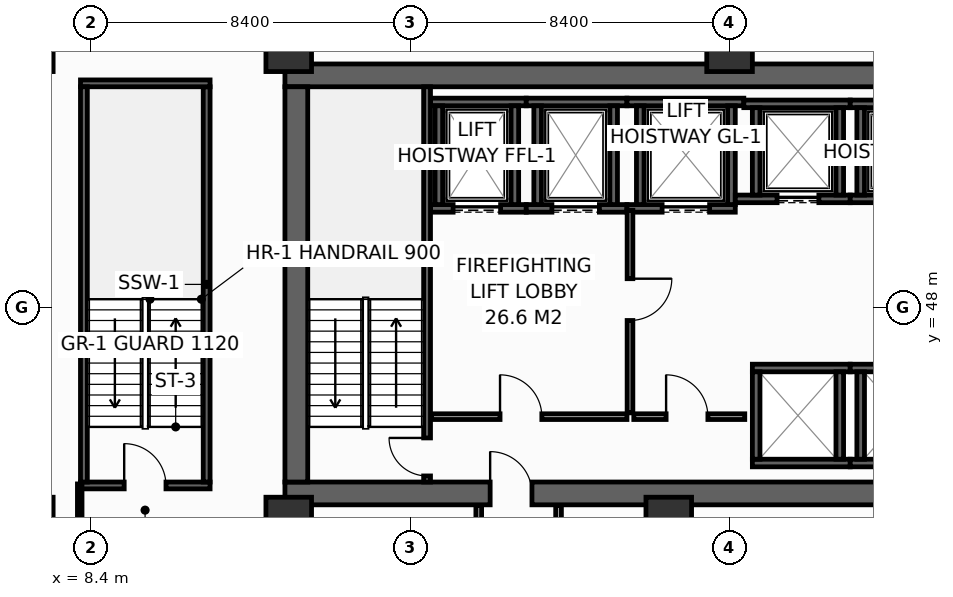
"""IFC4 building model, lengths in metres.
Left out: names, types, materials, properties, quantities, classifications, styles, units other than length and angle.
Written with IfcOpenShell. Run it as: python <this file> out.ifc"""

import sys

from ifc_helpers import new_model, si_unit, direction, frame, frame_2d, origin, origin_2d, place, context, subcontext, project, spatial, rectangle, hollow_rectangle, extrude, element, fill, save


model = new_model("IFC4")
c1 = context("Model", 3, precision=1e-05, world=origin(), true_north=direction((0.0, 1.0)))
c2 = subcontext(c1, "Body", "Model", "MODEL_VIEW")
j1 = project(units=[si_unit("LENGTHUNIT", "METRE"), si_unit("PLANEANGLEUNIT", "RADIAN")], contexts=[c1])
p1 = place(None, origin())
s1 = spatial("IfcSite", under=j1, at=p1, CompositionType="ELEMENT")
p2 = place(p1, origin())
s2 = spatial("IfcBuilding", under=s1, at=p2, CompositionType="ELEMENT")
p3 = place(p2, frame((0.0, 0.0, 42.8)))
s3 = spatial("IfcBuildingStorey", under=s2, at=p3, CompositionType="ELEMENT", Elevation=42.8)
p4 = place(p3, frame((13.5, 43.1, 0.0), z_axis=(0.0, 0.0, 1.0), x_axis=(1.0, 0.0, 0.0)))
e1 = element("IfcWall", 1, at=p4, inside=s3, PredefinedType="SHEAR", context=c2, shape_type="SweptSolid", body=[
    extrude(rectangle(XDim=32.9, YDim=0.6, at=frame_2d((16.45, 0.0))), origin(), (0.0, 0.0, 1.0), 4.15),
])
p5 = place(p4, frame((5.4, 0.0, 0.0)))
e2 = element("IfcOpeningElement", 2, at=p5, cuts=e1, PredefinedType="OPENING", context=c2, shape_type="SweptSolid", body=[
    extrude(rectangle(XDim=1.1, YDim=2.15, at=frame_2d((0.55, 1.075))), frame((0.0, 0.31, 0.0), z_axis=(0.0, -1.0, 0.0), x_axis=(1.0, 0.0, 0.0)), (0.0, 0.0, 1.0), 0.62),
])
p6 = place(p4, frame((25.6, 0.0, 0.0)))
e3 = element("IfcOpeningElement", 3, at=p6, cuts=e1, PredefinedType="OPENING", context=c2, shape_type="SweptSolid", body=[
    extrude(rectangle(XDim=1.1, YDim=2.15, at=frame_2d((0.55, 1.075))), frame((0.0, 0.31, 0.0), z_axis=(0.0, -1.0, 0.0), x_axis=(1.0, 0.0, 0.0)), (0.0, 0.0, 1.0), 0.62),
])
p7 = place(p3, frame((13.5, 54.1, 0.0), z_axis=(0.0, 0.0, 1.0), x_axis=(1.0, 0.0, 0.0)))
e4 = element("IfcWall", 4, at=p7, inside=s3, PredefinedType="SHEAR", context=c2, shape_type="SweptSolid", body=[
    extrude(rectangle(XDim=32.9, YDim=0.6, at=frame_2d((16.45, 0.0))), origin(), (0.0, 0.0, 1.0), 4.15),
])
p8 = place(p3, frame((13.8, 43.4, 0.0), z_axis=(0.0, 0.0, 1.0), x_axis=(0.0, 1.0, 0.0)))
e5 = element("IfcWall", 5, at=p8, inside=s3, PredefinedType="SHEAR", context=c2, shape_type="SweptSolid", body=[
    extrude(rectangle(XDim=10.4, YDim=0.6, at=frame_2d((5.2, 0.0))), origin(), (0.0, 0.0, 1.0), 4.15),
])
for number, where, z_axis, x_axis in (
    (6, (6.8, 54.8, 0.0), (0.0, 0.0, 1.0), (1.0, 0.0, 0.0)),
    (7, (13.6, 54.8, 0.0), (0.0, 0.0, 1.0), (1.0, 0.0, 0.0)),
    (8, (25.2, 54.8, 0.0), (0.0, 0.0, 1.0), (1.0, 0.0, 0.0)),
    (9, (6.8, 42.4, 0.0), (0.0, 0.0, 1.0), (1.0, 0.0, 0.0)),
    (10, (13.6, 42.4, 0.0), (0.0, 0.0, 1.0), (1.0, 0.0, 0.0)),
    (11, (23.6, 42.4, 0.0), (0.0, 0.0, 1.0), (1.0, 0.0, 0.0)),
):
    element("IfcColumn", number, at=place(p3, frame(where, z_axis=z_axis, x_axis=x_axis)), inside=s3, PredefinedType="COLUMN", context=c2, shape_type="SweptSolid", body=[
        extrude(hollow_rectangle(XDim=1.2, YDim=1.2, WallThickness=0.055, at=origin_2d()), origin(), (0.0, 0.0, 1.0), 4.4),
    ])
p9 = place(p3, frame((17.33, 50.6, 0.0), z_axis=(0.0, 0.0, 1.0), x_axis=(1.0, 0.0, 0.0)))
e12 = element("IfcWall", 12, at=p9, inside=s3, PredefinedType="SHEAR", context=c2, shape_type="SweptSolid", body=[
    extrude(rectangle(XDim=2.52, YDim=0.2, at=frame_2d((1.26, 0.0))), origin(), (0.0, 0.0, 1.0), 4.15),
])
p10 = place(p9, frame((0.595, 0.0, 0.0)))
e13 = element("IfcOpeningElement", 13, at=p10, cuts=e12, PredefinedType="OPENING", context=c2, shape_type="SweptSolid", body=[
    extrude(rectangle(XDim=1.25, YDim=2.3, at=frame_2d((0.625, 1.15))), frame((0.0, 0.11, 0.0), z_axis=(0.0, -1.0, 0.0), x_axis=(1.0, 0.0, 0.0)), (0.0, 0.0, 1.0), 0.22),
])
p11 = place(p3, frame((17.33, 53.4, 0.0), z_axis=(0.0, 0.0, 1.0), x_axis=(1.0, 0.0, 0.0)))
e14 = element("IfcWall", 14, at=p11, inside=s3, PredefinedType="SHEAR", context=c2, shape_type="SweptSolid", body=[
    extrude(rectangle(XDim=2.52, YDim=0.2, at=frame_2d((1.26, 0.0))), origin(), (0.0, 0.0, 1.0), 4.15),
])
for number, where, z_axis, x_axis in (
    (15, (17.55, 50.7, 0.0), (0.0, 0.0, 1.0), (0.0, 1.0, 0.0)),
    (16, (19.55, 50.7, 0.0), (0.0, 0.0, 1.0), (0.0, 1.0, 0.0)),
):
    element("IfcWall", number, at=place(p3, frame(where, z_axis=z_axis, x_axis=x_axis)), inside=s3, PredefinedType="SHEAR", context=c2, shape_type="SweptSolid", body=[
        extrude(rectangle(XDim=2.6, YDim=0.2, at=frame_2d((1.3, 0.0))), origin(), (0.0, 0.0, 1.0), 4.15),
    ])
p12 = place(p3, frame((19.85, 50.6, 0.0), z_axis=(0.0, 0.0, 1.0), x_axis=(1.0, 0.0, 0.0)))
e17 = element("IfcWall", 17, at=p12, inside=s3, PredefinedType="SHEAR", context=c2, shape_type="SweptSolid", body=[
    extrude(rectangle(XDim=2.65, YDim=0.2, at=frame_2d((1.325, 0.0))), origin(), (0.0, 0.0, 1.0), 4.15),
])
p13 = place(p12, frame((0.675, 0.0, 0.0)))
e18 = element("IfcOpeningElement", 18, at=p13, cuts=e17, PredefinedType="OPENING", context=c2, shape_type="SweptSolid", body=[
    extrude(rectangle(XDim=1.25, YDim=2.3, at=frame_2d((0.625, 1.15))), frame((0.0, 0.11, 0.0), z_axis=(0.0, -1.0, 0.0), x_axis=(1.0, 0.0, 0.0)), (0.0, 0.0, 1.0), 0.22),
])
p14 = place(p3, frame((19.85, 53.4, 0.0), z_axis=(0.0, 0.0, 1.0), x_axis=(1.0, 0.0, 0.0)))
e19 = element("IfcWall", 19, at=p14, inside=s3, PredefinedType="SHEAR", context=c2, shape_type="SweptSolid", body=[
    extrude(rectangle(XDim=2.65, YDim=0.2, at=frame_2d((1.325, 0.0))), origin(), (0.0, 0.0, 1.0), 4.15),
])
for number, where, z_axis, x_axis in (
    (20, (20.15, 50.7, 0.0), (0.0, 0.0, 1.0), (0.0, 1.0, 0.0)),
    (21, (22.15, 50.7, 0.0), (0.0, 0.0, 1.0), (0.0, 1.0, 0.0)),
):
    element("IfcWall", number, at=place(p3, frame(where, z_axis=z_axis, x_axis=x_axis)), inside=s3, PredefinedType="SHEAR", context=c2, shape_type="SweptSolid", body=[
        extrude(rectangle(XDim=2.6, YDim=0.2, at=frame_2d((1.3, 0.0))), origin(), (0.0, 0.0, 1.0), 4.15),
    ])
p15 = place(p3, frame((22.5, 50.6, 0.0), z_axis=(0.0, 0.0, 1.0), x_axis=(1.0, 0.0, 0.0)))
e22 = element("IfcWall", 22, at=p15, inside=s3, PredefinedType="SHEAR", context=c2, shape_type="SweptSolid", body=[
    extrude(rectangle(XDim=2.85, YDim=0.2, at=frame_2d((1.425, 0.0))), origin(), (0.0, 0.0, 1.0), 4.15),
])
p16 = place(p15, frame((0.925, 0.0, 0.0)))
e23 = element("IfcOpeningElement", 23, at=p16, cuts=e22, PredefinedType="OPENING", context=c2, shape_type="SweptSolid", body=[
    extrude(rectangle(XDim=1.25, YDim=2.3, at=frame_2d((0.625, 1.15))), frame((0.0, 0.11, 0.0), z_axis=(0.0, -1.0, 0.0), x_axis=(1.0, 0.0, 0.0)), (0.0, 0.0, 1.0), 0.22),
])
p17 = place(p3, frame((22.5, 53.4, 0.0), z_axis=(0.0, 0.0, 1.0), x_axis=(1.0, 0.0, 0.0)))
e24 = element("IfcWall", 24, at=p17, inside=s3, PredefinedType="SHEAR", context=c2, shape_type="SweptSolid", body=[
    extrude(rectangle(XDim=3.075, YDim=0.2, at=frame_2d((1.538, 0.0))), origin(), (0.0, 0.0, 1.0), 4.15),
])
for number, where, z_axis, x_axis in (
    (25, (22.85, 50.7, 0.0), (0.0, 0.0, 1.0), (0.0, 1.0, 0.0)),
    (26, (25.25, 50.7, 0.0), (0.0, 0.0, 1.0), (0.0, 1.0, 0.0)),
):
    element("IfcWall", number, at=place(p3, frame(where, z_axis=z_axis, x_axis=x_axis)), inside=s3, PredefinedType="SHEAR", context=c2, shape_type="SweptSolid", body=[
        extrude(rectangle(XDim=2.6, YDim=0.2, at=frame_2d((1.3, 0.0))), origin(), (0.0, 0.0, 1.0), 4.15),
    ])
p18 = place(p3, frame((25.35, 50.85, 0.0), z_axis=(0.0, 0.0, 1.0), x_axis=(1.0, 0.0, 0.0)))
e27 = element("IfcWall", 27, at=p18, inside=s3, PredefinedType="SHEAR", context=c2, shape_type="SweptSolid", body=[
    extrude(rectangle(XDim=3.025, YDim=0.2, at=frame_2d((1.512, 0.0))), origin(), (0.0, 0.0, 1.0), 4.15),
])
p19 = place(p18, frame((1.1, 0.0, 0.0)))
e28 = element("IfcOpeningElement", 28, at=p19, cuts=e27, PredefinedType="OPENING", context=c2, shape_type="SweptSolid", body=[
    extrude(rectangle(XDim=1.1, YDim=2.2, at=frame_2d((0.55, 1.1))), frame((0.0, 0.11, 0.0), z_axis=(0.0, -1.0, 0.0), x_axis=(1.0, 0.0, 0.0)), (0.0, 0.0, 1.0), 0.22),
])
p20 = place(p3, frame((25.575, 53.35, 0.0), z_axis=(0.0, 0.0, 1.0), x_axis=(1.0, 0.0, 0.0)))
e29 = element("IfcWall", 29, at=p20, inside=s3, PredefinedType="SHEAR", context=c2, shape_type="SweptSolid", body=[
    extrude(rectangle(XDim=2.8, YDim=0.2, at=frame_2d((1.4, 0.0))), origin(), (0.0, 0.0, 1.0), 4.15),
])
for number, where, z_axis, x_axis in (
    (30, (25.9, 50.95, 0.0), (0.0, 0.0, 1.0), (0.0, 1.0, 0.0)),
    (31, (28.1, 50.95, 0.0), (0.0, 0.0, 1.0), (0.0, 1.0, 0.0)),
):
    element("IfcWall", number, at=place(p3, frame(where, z_axis=z_axis, x_axis=x_axis)), inside=s3, PredefinedType="SHEAR", context=c2, shape_type="SweptSolid", body=[
        extrude(rectangle(XDim=2.3, YDim=0.2, at=frame_2d((1.15, 0.0))), origin(), (0.0, 0.0, 1.0), 4.15),
    ])
p21 = place(p3, frame((28.375, 50.85, 0.0), z_axis=(0.0, 0.0, 1.0), x_axis=(1.0, 0.0, 0.0)))
e32 = element("IfcWall", 32, at=p21, inside=s3, PredefinedType="SHEAR", context=c2, shape_type="SweptSolid", body=[
    extrude(rectangle(XDim=2.75, YDim=0.2, at=frame_2d((1.375, 0.0))), origin(), (0.0, 0.0, 1.0), 4.15),
])
p22 = place(p21, frame((0.825, 0.0, 0.0)))
e33 = element("IfcOpeningElement", 33, at=p22, cuts=e32, PredefinedType="OPENING", context=c2, shape_type="SweptSolid", body=[
    extrude(rectangle(XDim=1.1, YDim=2.2, at=frame_2d((0.55, 1.1))), frame((0.0, 0.11, 0.0), z_axis=(0.0, -1.0, 0.0), x_axis=(1.0, 0.0, 0.0)), (0.0, 0.0, 1.0), 0.22),
])
p23 = place(p3, frame((28.375, 53.35, 0.0), z_axis=(0.0, 0.0, 1.0), x_axis=(1.0, 0.0, 0.0)))
e34 = element("IfcWall", 34, at=p23, inside=s3, PredefinedType="SHEAR", context=c2, shape_type="SweptSolid", body=[
    extrude(rectangle(XDim=2.75, YDim=0.2, at=frame_2d((1.375, 0.0))), origin(), (0.0, 0.0, 1.0), 4.15),
])
p24 = place(p3, frame((28.65, 50.95, 0.0), z_axis=(0.0, 0.0, 1.0), x_axis=(0.0, 1.0, 0.0)))
e35 = element("IfcWall", 35, at=p24, inside=s3, PredefinedType="SHEAR", context=c2, shape_type="SweptSolid", body=[
    extrude(rectangle(XDim=2.3, YDim=0.2, at=frame_2d((1.15, 0.0))), origin(), (0.0, 0.0, 1.0), 4.15),
])
for number, where, z_axis, x_axis in (
    (36, (25.8, 43.9, 0.0), (0.0, 0.0, 1.0), (1.0, 0.0, 0.0)),
    (37, (25.8, 46.4, 0.0), (0.0, 0.0, 1.0), (1.0, 0.0, 0.0)),
):
    element("IfcWall", number, at=place(p3, frame(where, z_axis=z_axis, x_axis=x_axis)), inside=s3, PredefinedType="SHEAR", context=c2, shape_type="SweptSolid", body=[
        extrude(rectangle(XDim=2.575, YDim=0.2, at=frame_2d((1.288, 0.0))), origin(), (0.0, 0.0, 1.0), 4.15),
    ])
for number, where, z_axis, x_axis in (
    (38, (25.9, 44.0, 0.0), (0.0, 0.0, 1.0), (0.0, 1.0, 0.0)),
    (39, (28.1, 44.0, 0.0), (0.0, 0.0, 1.0), (0.0, 1.0, 0.0)),
):
    element("IfcWall", number, at=place(p3, frame(where, z_axis=z_axis, x_axis=x_axis)), inside=s3, PredefinedType="SHEAR", context=c2, shape_type="SweptSolid", body=[
        extrude(rectangle(XDim=2.3, YDim=0.2, at=frame_2d((1.15, 0.0))), origin(), (0.0, 0.0, 1.0), 4.15),
    ])
for number, where, z_axis, x_axis in (
    (40, (28.375, 43.9, 0.0), (0.0, 0.0, 1.0), (1.0, 0.0, 0.0)),
    (41, (28.375, 46.4, 0.0), (0.0, 0.0, 1.0), (1.0, 0.0, 0.0)),
):
    element("IfcWall", number, at=place(p3, frame(where, z_axis=z_axis, x_axis=x_axis)), inside=s3, PredefinedType="SHEAR", context=c2, shape_type="SweptSolid", body=[
        extrude(rectangle(XDim=2.75, YDim=0.2, at=frame_2d((1.375, 0.0))), origin(), (0.0, 0.0, 1.0), 4.15),
    ])
p25 = place(p3, frame((28.65, 44.0, 0.0), z_axis=(0.0, 0.0, 1.0), x_axis=(0.0, 1.0, 0.0)))
e42 = element("IfcWall", 42, at=p25, inside=s3, PredefinedType="SHEAR", context=c2, shape_type="SweptSolid", body=[
    extrude(rectangle(XDim=2.3, YDim=0.2, at=frame_2d((1.15, 0.0))), origin(), (0.0, 0.0, 1.0), 4.15),
])
p26 = place(p3, frame((17.24, 43.4, 0.0), z_axis=(0.0, 0.0, 1.0), x_axis=(0.0, 1.0, 0.0)))
e43 = element("IfcWall", 43, at=p26, inside=s3, PredefinedType="SHEAR", context=c2, shape_type="SweptSolid", body=[
    extrude(rectangle(XDim=10.4, YDim=0.18, at=frame_2d((5.2, 0.0))), origin(), (0.0, 0.0, 1.0), 4.15),
])
p27 = place(p26, frame((0.16, 0.0, 0.0)))
e44 = element("IfcOpeningElement", 44, at=p27, cuts=e43, PredefinedType="OPENING", context=c2, shape_type="SweptSolid", body=[
    extrude(rectangle(XDim=1.0, YDim=2.15, at=frame_2d((0.5, 1.075))), frame((0.0, 0.1, 0.0), z_axis=(0.0, -1.0, 0.0), x_axis=(1.0, 0.0, 0.0)), (0.0, 0.0, 1.0), 0.2),
])
p28 = place(p3, frame((8.12, 43.31, 0.0), z_axis=(0.0, 0.0, 1.0), x_axis=(1.0, 0.0, 0.0)))
e45 = element("IfcWall", 45, at=p28, inside=s3, PredefinedType="SHEAR", context=c2, shape_type="SweptSolid", body=[
    extrude(rectangle(XDim=3.41, YDim=0.18, at=frame_2d((1.705, 0.0))), origin(), (0.0, 0.0, 1.0), 4.15),
])
p29 = place(p28, frame((1.15, 0.0, 0.0)))
e46 = element("IfcOpeningElement", 46, at=p29, cuts=e45, PredefinedType="OPENING", context=c2, shape_type="SweptSolid", body=[
    extrude(rectangle(XDim=1.1, YDim=2.15, at=frame_2d((0.55, 1.075))), frame((0.0, 0.1, 0.0), z_axis=(0.0, -1.0, 0.0), x_axis=(1.0, 0.0, 0.0)), (0.0, 0.0, 1.0), 0.2),
])
p30 = place(p3, frame((11.44, 43.4, 0.0), z_axis=(0.0, 0.0, 1.0), x_axis=(0.0, 1.0, 0.0)))
e47 = element("IfcWall", 47, at=p30, inside=s3, PredefinedType="SHEAR", context=c2, shape_type="SweptSolid", body=[
    extrude(rectangle(XDim=10.4, YDim=0.18, at=frame_2d((5.2, 0.0))), origin(), (0.0, 0.0, 1.0), 4.15),
])
p31 = place(p3, frame((11.53, 53.89, 0.0), z_axis=(0.0, 0.0, 1.0), x_axis=(-1.0, 0.0, 0.0)))
e48 = element("IfcWall", 48, at=p31, inside=s3, PredefinedType="SHEAR", context=c2, shape_type="SweptSolid", body=[
    extrude(rectangle(XDim=3.41, YDim=0.18, at=frame_2d((1.705, 0.0))), origin(), (0.0, 0.0, 1.0), 4.15),
])
p32 = place(p3, frame((8.21, 53.8, 0.0), z_axis=(0.0, 0.0, 1.0), x_axis=(0.0, -1.0, 0.0)))
e49 = element("IfcWall", 49, at=p32, inside=s3, PredefinedType="SHEAR", context=c2, shape_type="SweptSolid", body=[
    extrude(rectangle(XDim=10.4, YDim=0.18, at=frame_2d((5.2, 0.0))), origin(), (0.0, 0.0, 1.0), 4.15),
])
p33 = place(p3, frame((17.36, 45.12, 0.0), z_axis=(0.0, 0.0, 1.0), x_axis=(1.0, 0.0, 0.0)))
e50 = element("IfcWall", 50, at=p33, inside=s3, PredefinedType="PARTITIONING", context=c2, shape_type="SweptSolid", body=[
    extrude(rectangle(XDim=5.14, YDim=0.15, at=frame_2d((2.57, 0.0))), origin(), (0.0, 0.0, 1.0), 4.15),
])
p34 = place(p33, frame((1.8, 0.0, 0.0)))
e51 = element("IfcOpeningElement", 51, at=p34, cuts=e50, PredefinedType="OPENING", context=c2, shape_type="SweptSolid", body=[
    extrude(rectangle(XDim=1.1, YDim=2.15, at=frame_2d((0.55, 1.075))), frame((0.0, 0.085, 0.0), z_axis=(0.0, -1.0, 0.0), x_axis=(1.0, 0.0, 0.0)), (0.0, 0.0, 1.0), 0.17),
])
p35 = place(p3, frame((22.58, 50.55, 0.0), z_axis=(0.0, 0.0, 1.0), x_axis=(0.0, -1.0, 0.0)))
e52 = element("IfcWall", 52, at=p35, inside=s3, PredefinedType="PARTITIONING", context=c2, shape_type="SweptSolid", body=[
    extrude(rectangle(XDim=5.33, YDim=0.15, at=frame_2d((2.665, 0.0))), origin(), (0.0, 0.0, 1.0), 4.15),
])
p36 = place(p35, frame((1.8, 0.0, 0.0)))
e53 = element("IfcOpeningElement", 53, at=p36, cuts=e52, PredefinedType="OPENING", context=c2, shape_type="SweptSolid", body=[
    extrude(rectangle(XDim=1.1, YDim=2.15, at=frame_2d((0.55, 1.075))), frame((0.0, 0.085, 0.0), z_axis=(0.0, -1.0, 0.0), x_axis=(1.0, 0.0, 0.0)), (0.0, 0.0, 1.0), 0.17),
])
p37 = place(p3, frame((22.68, 45.12, 0.0), z_axis=(0.0, 0.0, 1.0), x_axis=(1.0, 0.0, 0.0)))
e54 = element("IfcWall", 54, at=p37, inside=s3, PredefinedType="PARTITIONING", context=c2, shape_type="SweptSolid", body=[
    extrude(rectangle(XDim=2.92, YDim=0.15, at=frame_2d((1.46, 0.0))), origin(), (0.0, 0.0, 1.0), 4.15),
])
p38 = place(p37, frame((0.85, 0.0, 0.0)))
e55 = element("IfcOpeningElement", 55, at=p38, cuts=e54, PredefinedType="OPENING", context=c2, shape_type="SweptSolid", body=[
    extrude(rectangle(XDim=1.1, YDim=2.15, at=frame_2d((0.55, 1.075))), frame((0.0, 0.085, 0.0), z_axis=(0.0, -1.0, 0.0), x_axis=(1.0, 0.0, 0.0)), (0.0, 0.0, 1.0), 0.17),
])
p39 = place(p3, frame((13.8, 41.03, 0.0), z_axis=(0.0, 0.0, 1.0), x_axis=(0.0, 1.0, 0.0)))
e56 = element("IfcWall", 56, at=p39, inside=s3, PredefinedType="PARTITIONING", context=c2, shape_type="SweptSolid", body=[
    extrude(rectangle(XDim=1.75, YDim=0.12, at=frame_2d((0.875, 0.0))), origin(), (0.0, 0.0, 1.0), 4.15),
])
p40 = place(p3, frame((8.1, 40.95, 0.0), z_axis=(0.0, 0.0, 1.0), x_axis=(0.0, 1.0, 0.0)))
e57 = element("IfcWall", 57, at=p40, inside=s3, PredefinedType="PARTITIONING", context=c2, shape_type="SweptSolid", body=[
    extrude(rectangle(XDim=2.4, YDim=0.12, at=frame_2d((1.2, 0.0))), origin(), (0.0, 0.0, 1.0), 3.335),
])
for number, where, z_axis, x_axis in (
    (58, (18.6, 40.95, 0.0), (0.0, 0.0, 1.0), (0.0, 1.0, 0.0)),
    (59, (20.7, 40.95, 0.0), (0.0, 0.0, 1.0), (0.0, 1.0, 0.0)),
):
    element("IfcWall", number, at=place(p3, frame(where, z_axis=z_axis, x_axis=x_axis)), inside=s3, PredefinedType="PARTITIONING", context=c2, shape_type="SweptSolid", body=[
        extrude(rectangle(XDim=1.83, YDim=0.15, at=frame_2d((0.915, 0.0))), origin(), (0.0, 0.0, 1.0), 4.15),
    ])
p41 = place(p10, origin())
e60 = element("IfcDoor", 60, at=p41, inside=s3, OperationType="SLIDING_TO_LEFT", PredefinedType="DOOR", context=c2, shape_type="SweptSolid", body=[
    extrude(rectangle(XDim=1.25, YDim=2.3, at=frame_2d((0.625, 1.15))), frame((0.0, 0.025, 0.0), z_axis=(0.0, -1.0, 0.0), x_axis=(1.0, 0.0, 0.0)), (0.0, 0.0, 1.0), 0.05),
])
fill(e13, e60)
p42 = place(p13, origin())
e61 = element("IfcDoor", 61, at=p42, inside=s3, OperationType="SLIDING_TO_LEFT", PredefinedType="DOOR", context=c2, shape_type="SweptSolid", body=[
    extrude(rectangle(XDim=1.25, YDim=2.3, at=frame_2d((0.625, 1.15))), frame((0.0, 0.025, 0.0), z_axis=(0.0, -1.0, 0.0), x_axis=(1.0, 0.0, 0.0)), (0.0, 0.0, 1.0), 0.05),
])
fill(e18, e61)
p43 = place(p16, origin())
e62 = element("IfcDoor", 62, at=p43, inside=s3, OperationType="SLIDING_TO_LEFT", PredefinedType="DOOR", context=c2, shape_type="SweptSolid", body=[
    extrude(rectangle(XDim=1.25, YDim=2.3, at=frame_2d((0.625, 1.15))), frame((0.0, 0.025, 0.0), z_axis=(0.0, -1.0, 0.0), x_axis=(1.0, 0.0, 0.0)), (0.0, 0.0, 1.0), 0.05),
])
fill(e23, e62)
p44 = place(p19, origin())
e63 = element("IfcDoor", 63, at=p44, inside=s3, OperationType="SLIDING_TO_LEFT", PredefinedType="DOOR", context=c2, shape_type="SweptSolid", body=[
    extrude(rectangle(XDim=1.1, YDim=2.2, at=frame_2d((0.55, 1.1))), frame((0.0, 0.025, 0.0), z_axis=(0.0, -1.0, 0.0), x_axis=(1.0, 0.0, 0.0)), (0.0, 0.0, 1.0), 0.05),
])
fill(e28, e63)
p45 = place(p27, origin())
e64 = element("IfcDoor", 64, at=p45, inside=s3, OperationType="SINGLE_SWING_RIGHT", PredefinedType="DOOR", context=c2, shape_type="SweptSolid", body=[
    extrude(rectangle(XDim=1.0, YDim=2.15, at=frame_2d((0.5, 1.075))), frame((0.0, 0.025, 0.0), z_axis=(0.0, -1.0, 0.0), x_axis=(1.0, 0.0, 0.0)), (0.0, 0.0, 1.0), 0.05),
])
fill(e44, e64)
p46 = place(p29, origin())
e65 = element("IfcDoor", 65, at=p46, inside=s3, OperationType="SINGLE_SWING_LEFT", PredefinedType="DOOR", context=c2, shape_type="SweptSolid", body=[
    extrude(rectangle(XDim=1.1, YDim=2.15, at=frame_2d((0.55, 1.075))), frame((0.0, 0.025, 0.0), z_axis=(0.0, -1.0, 0.0), x_axis=(1.0, 0.0, 0.0)), (0.0, 0.0, 1.0), 0.05),
])
fill(e46, e65)
p47 = place(p34, origin())
e66 = element("IfcDoor", 66, at=p47, inside=s3, OperationType="SINGLE_SWING_LEFT", PredefinedType="DOOR", context=c2, shape_type="SweptSolid", body=[
    extrude(rectangle(XDim=1.1, YDim=2.15, at=frame_2d((0.55, 1.075))), frame((0.0, 0.025, 0.0), z_axis=(0.0, -1.0, 0.0), x_axis=(1.0, 0.0, 0.0)), (0.0, 0.0, 1.0), 0.05),
])
fill(e51, e66)
p48 = place(p36, origin())
e67 = element("IfcDoor", 67, at=p48, inside=s3, OperationType="SINGLE_SWING_LEFT", PredefinedType="DOOR", context=c2, shape_type="SweptSolid", body=[
    extrude(rectangle(XDim=1.1, YDim=2.15, at=frame_2d((0.55, 1.075))), frame((0.0, 0.025, 0.0), z_axis=(0.0, -1.0, 0.0), x_axis=(1.0, 0.0, 0.0)), (0.0, 0.0, 1.0), 0.05),
])
fill(e53, e67)
p49 = place(p38, origin())
e68 = element("IfcDoor", 68, at=p49, inside=s3, OperationType="SINGLE_SWING_LEFT", PredefinedType="DOOR", context=c2, shape_type="SweptSolid", body=[
    extrude(rectangle(XDim=1.1, YDim=2.15, at=frame_2d((0.55, 1.075))), frame((0.0, 0.025, 0.0), z_axis=(0.0, -1.0, 0.0), x_axis=(1.0, 0.0, 0.0)), (0.0, 0.0, 1.0), 0.05),
])
fill(e55, e68)
p50 = place(p5, origin())
e69 = element("IfcDoor", 69, at=p50, inside=s3, OperationType="SINGLE_SWING_LEFT", PredefinedType="DOOR", context=c2, shape_type="SweptSolid", body=[
    extrude(rectangle(XDim=1.1, YDim=2.15, at=frame_2d((0.55, 1.075))), frame((0.0, 0.025, 0.0), z_axis=(0.0, -1.0, 0.0), x_axis=(1.0, 0.0, 0.0)), (0.0, 0.0, 1.0), 0.05),
])
fill(e2, e69)
save(model, sys.argv[1])
